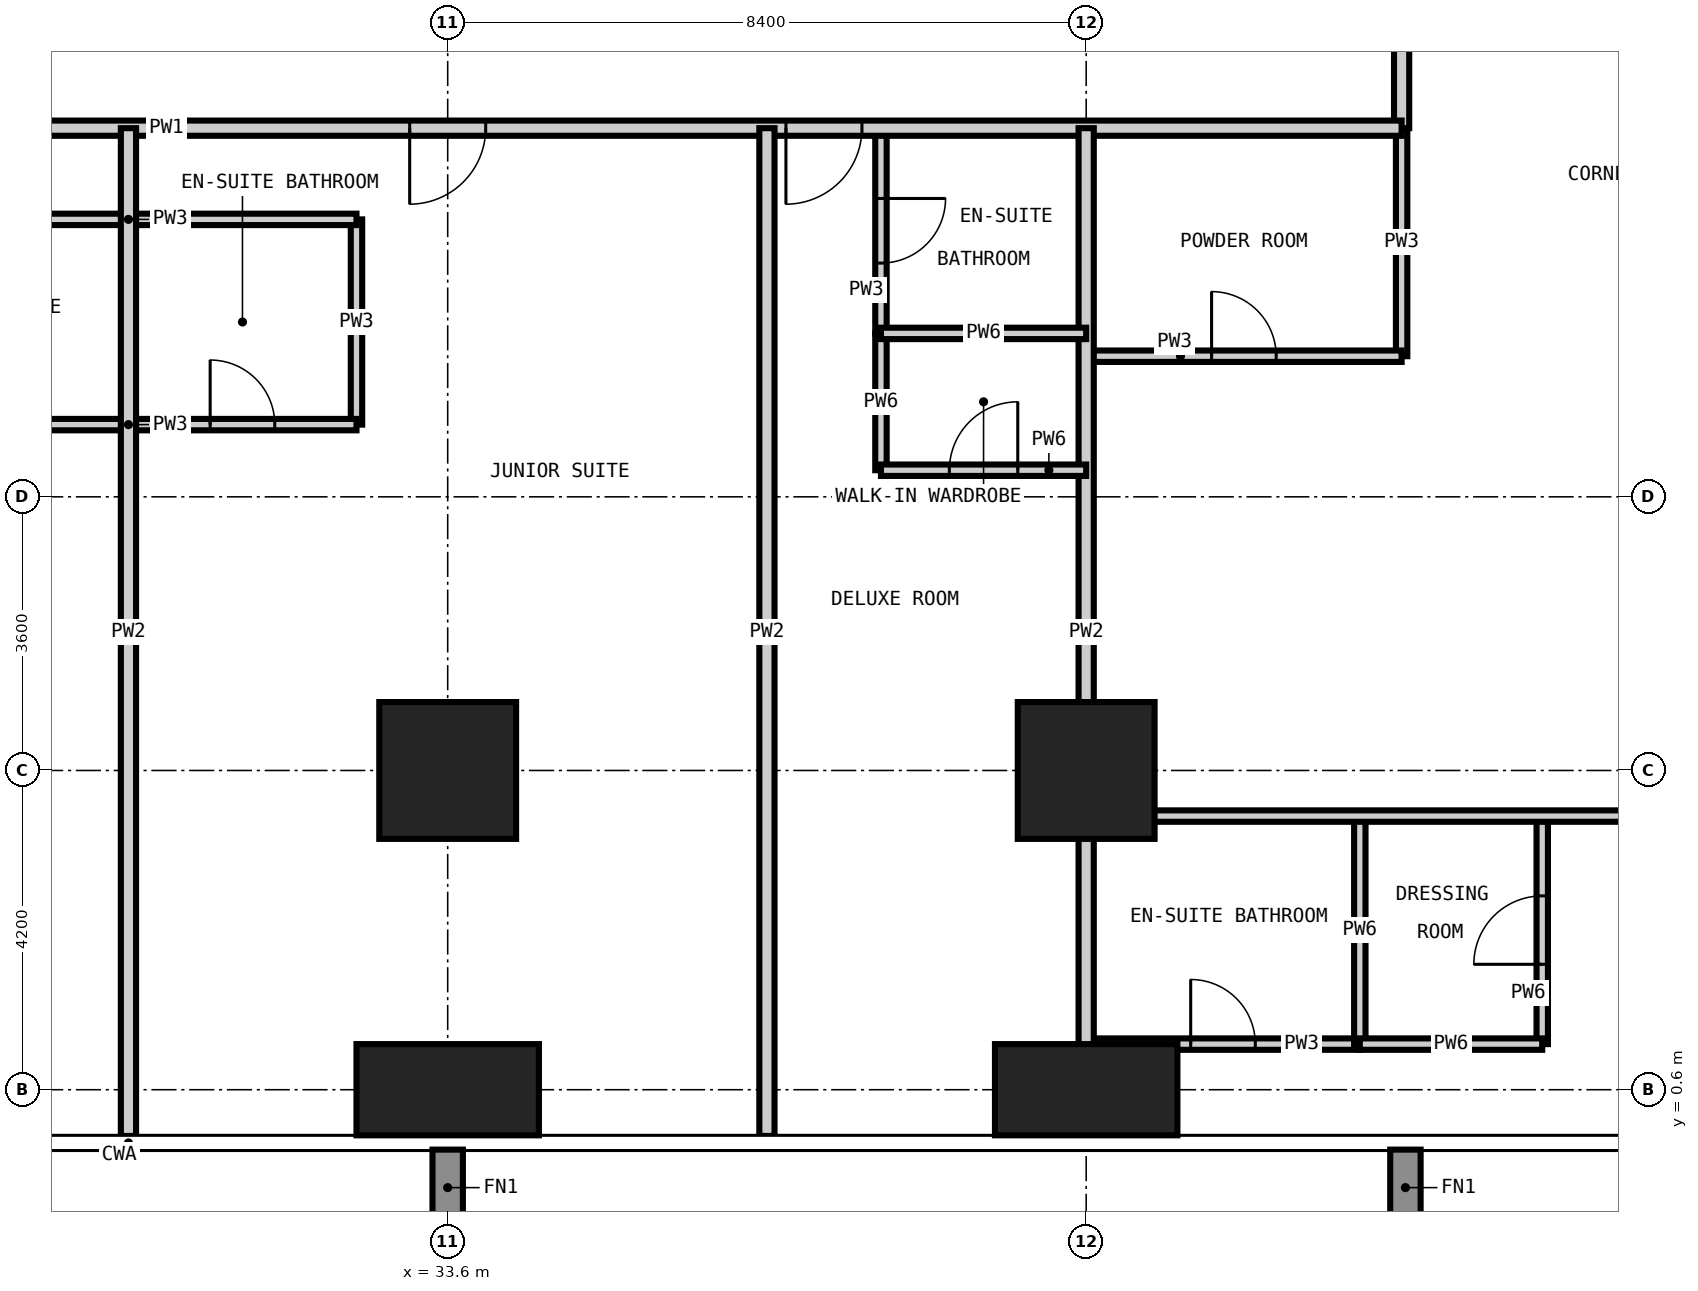
"""IFC4 building model, lengths in metres.
Left out: names, types, materials, properties, quantities, classifications, styles, units other than length and angle.
Written with IfcOpenShell. Run it as: python <this file> out.ifc"""

import sys

from ifc_helpers import new_model, si_unit, direction, frame, frame_2d, origin, origin_2d, place, context, subcontext, project, spatial, rectangle, extrude, element, fill, save


model = new_model("IFC4")
c1 = context("Model", 3, precision=1e-05, world=origin(), true_north=direction((0.0, 1.0)))
c2 = subcontext(c1, "Body", "Model", "MODEL_VIEW")
j1 = project(units=[si_unit("LENGTHUNIT", "METRE"), si_unit("PLANEANGLEUNIT", "RADIAN")], contexts=[c1])
p1 = place(None, origin())
s1 = spatial("IfcSite", under=j1, at=p1, CompositionType="ELEMENT")
p2 = place(p1, origin())
s2 = spatial("IfcBuilding", under=s1, at=p2, CompositionType="ELEMENT")
p3 = place(p2, frame((0.0, 0.0, 63.0)))
s3 = spatial("IfcBuildingStorey", under=s2, at=p3, CompositionType="ELEMENT", Elevation=63.0)
p4 = place(p3, frame((33.6, 0.6, -0.35), z_axis=(0.0, 0.0, 1.0), x_axis=(1.0, 0.0, 0.0)))
e1 = element("IfcColumn", 1, at=p4, inside=s3, PredefinedType="COLUMN", context=c2, shape_type="SweptSolid", body=[
    extrude(rectangle(XDim=2.4, YDim=1.2, at=origin_2d()), origin(), (0.0, 0.0, 1.0), 3.6),
])
p5 = place(p3, frame((33.6, 4.8, -0.35), z_axis=(0.0, 0.0, 1.0), x_axis=(1.0, 0.0, 0.0)))
e2 = element("IfcColumn", 2, at=p5, inside=s3, PredefinedType="COLUMN", context=c2, shape_type="SweptSolid", body=[
    extrude(rectangle(XDim=1.8, YDim=1.8, at=origin_2d()), origin(), (0.0, 0.0, 1.0), 3.6),
])
p6 = place(p3, frame((42.0, 0.6, -0.35), z_axis=(0.0, 0.0, 1.0), x_axis=(1.0, 0.0, 0.0)))
e3 = element("IfcColumn", 3, at=p6, inside=s3, PredefinedType="COLUMN", context=c2, shape_type="SweptSolid", body=[
    extrude(rectangle(XDim=2.4, YDim=1.2, at=origin_2d()), origin(), (0.0, 0.0, 1.0), 3.6),
])
p7 = place(p3, frame((42.0, 4.8, -0.35), z_axis=(0.0, 0.0, 1.0), x_axis=(1.0, 0.0, 0.0)))
e4 = element("IfcColumn", 4, at=p7, inside=s3, PredefinedType="COLUMN", context=c2, shape_type="SweptSolid", body=[
    extrude(rectangle(XDim=1.8, YDim=1.8, at=origin_2d()), origin(), (0.0, 0.0, 1.0), 3.6),
])
p8 = place(p3, frame((32.4, 9.35, 0.0), z_axis=(0.0, 0.0, 1.0), x_axis=(0.0, 1.0, 0.0)))
e5 = element("IfcWall", 5, at=p8, inside=s3, PredefinedType="PARTITIONING", context=c2, shape_type="SweptSolid", body=[
    extrude(rectangle(XDim=2.7, YDim=0.15, at=frame_2d((1.35, 0.0))), origin(), (0.0, 0.0, 1.0), 3.25),
])
p9 = place(p3, frame((39.3, 10.55, 0.0), z_axis=(0.0, 0.0, 1.0), x_axis=(0.0, 1.0, 0.0)))
e6 = element("IfcWall", 6, at=p9, inside=s3, PredefinedType="PARTITIONING", context=c2, shape_type="SweptSolid", body=[
    extrude(rectangle(XDim=2.7, YDim=0.15, at=frame_2d((1.35, 0.0))), origin(), (0.0, 0.0, 1.0), 3.25),
])
p10 = place(p9, frame((0.925, 0.0, 0.0)))
e7 = element("IfcOpeningElement", 7, at=p10, cuts=e6, PredefinedType="OPENING", context=c2, shape_type="SweptSolid", body=[
    extrude(rectangle(XDim=0.85, YDim=2.1, at=frame_2d((0.425, 1.05))), frame((0.0, 0.085, 0.0), z_axis=(0.0, -1.0, 0.0), x_axis=(1.0, 0.0, 0.0)), (0.0, 0.0, 1.0), 0.17),
])
p11 = place(p3, frame((46.15, 10.25, 0.0), z_axis=(0.0, 0.0, 1.0), x_axis=(0.0, 1.0, 0.0)))
e8 = element("IfcWall", 8, at=p11, inside=s3, PredefinedType="PARTITIONING", context=c2, shape_type="SweptSolid", body=[
    extrude(rectangle(XDim=3.0, YDim=0.15, at=frame_2d((1.5, 0.0))), origin(), (0.0, 0.0, 1.0), 3.25),
])
p12 = place(p3, frame((42.0, 1.2, 0.0), z_axis=(0.0, 0.0, 1.0), x_axis=(1.0, 0.0, 0.0)))
e9 = element("IfcWall", 9, at=p12, inside=s3, PredefinedType="PARTITIONING", context=c2, shape_type="SweptSolid", body=[
    extrude(rectangle(XDim=3.6, YDim=0.15, at=frame_2d((1.8, 0.0))), origin(), (0.0, 0.0, 1.0), 3.25),
])
p13 = place(p12, frame((1.375, 0.0, 0.0)))
e10 = element("IfcOpeningElement", 10, at=p13, cuts=e9, PredefinedType="OPENING", context=c2, shape_type="SweptSolid", body=[
    extrude(rectangle(XDim=0.85, YDim=2.1, at=frame_2d((0.425, 1.05))), frame((0.0, 0.085, 0.0), z_axis=(0.0, -1.0, 0.0), x_axis=(1.0, 0.0, 0.0)), (0.0, 0.0, 1.0), 0.17),
])
p14 = place(p3, frame((26.4, 9.35, 0.0), z_axis=(0.0, 0.0, 1.0), x_axis=(1.0, 0.0, 0.0)))
e11 = element("IfcWall", 11, at=p14, inside=s3, PredefinedType="PARTITIONING", context=c2, shape_type="SweptSolid", body=[
    extrude(rectangle(XDim=6.0, YDim=0.15, at=frame_2d((3.0, 0.0))), origin(), (0.0, 0.0, 1.0), 3.25),
])
p15 = place(p14, frame((4.075, 0.0, 0.0)))
e12 = element("IfcOpeningElement", 12, at=p15, cuts=e11, PredefinedType="OPENING", context=c2, shape_type="SweptSolid", body=[
    extrude(rectangle(XDim=0.85, YDim=2.1, at=frame_2d((0.425, 1.05))), frame((0.0, 0.085, 0.0), z_axis=(0.0, -1.0, 0.0), x_axis=(1.0, 0.0, 0.0)), (0.0, 0.0, 1.0), 0.17),
])
p16 = place(p3, frame((42.0, 10.25, 0.0), z_axis=(0.0, 0.0, 1.0), x_axis=(1.0, 0.0, 0.0)))
e13 = element("IfcWall", 13, at=p16, inside=s3, PredefinedType="PARTITIONING", context=c2, shape_type="SweptSolid", body=[
    extrude(rectangle(XDim=4.15, YDim=0.15, at=frame_2d((2.075, 0.0))), origin(), (0.0, 0.0, 1.0), 3.25),
])
p17 = place(p16, frame((1.65, 0.0, 0.0)))
e14 = element("IfcOpeningElement", 14, at=p17, cuts=e13, PredefinedType="OPENING", context=c2, shape_type="SweptSolid", body=[
    extrude(rectangle(XDim=0.85, YDim=2.1, at=frame_2d((0.425, 1.05))), frame((0.0, 0.085, 0.0), z_axis=(0.0, -1.0, 0.0), x_axis=(1.0, 0.0, 0.0)), (0.0, 0.0, 1.0), 0.17),
])
p18 = place(p3, frame((26.4, 12.05, 0.0), z_axis=(0.0, 0.0, 1.0), x_axis=(1.0, 0.0, 0.0)))
e15 = element("IfcWall", 15, at=p18, inside=s3, PredefinedType="PARTITIONING", context=c2, shape_type="SweptSolid", body=[
    extrude(rectangle(XDim=6.0, YDim=0.15, at=frame_2d((3.0, 0.0))), origin(), (0.0, 0.0, 1.0), 3.25),
])
p19 = place(p18, frame((1.075, 0.0, 0.0)))
e16 = element("IfcOpeningElement", 16, at=p19, cuts=e15, PredefinedType="OPENING", context=c2, shape_type="SweptSolid", body=[
    extrude(rectangle(XDim=0.85, YDim=2.1, at=frame_2d((0.425, 1.05))), frame((0.0, 0.085, 0.0), z_axis=(0.0, -1.0, 0.0), x_axis=(1.0, 0.0, 0.0)), (0.0, 0.0, 1.0), 0.17),
])
p20 = place(p3, frame((46.15, 44.95, 0.0), z_axis=(0.0, 0.0, 1.0), x_axis=(0.0, -1.0, 0.0)))
e17 = element("IfcWall", 17, at=p20, inside=s3, PredefinedType="PARTITIONING", context=c2, shape_type="SweptSolid", body=[
    extrude(rectangle(XDim=31.7, YDim=0.2, at=frame_2d((15.85, 0.0))), origin(), (0.0, 0.0, 1.0), 3.25),
])
p21 = place(p20, frame((24.65, 0.0, 0.0)))
e18 = element("IfcOpeningElement", 18, at=p21, cuts=e17, PredefinedType="OPENING", context=c2, shape_type="SweptSolid", body=[
    extrude(rectangle(XDim=1.0, YDim=2.2, at=frame_2d((0.5, 1.1))), frame((0.0, 0.11, 0.0), z_axis=(0.0, -1.0, 0.0), x_axis=(1.0, 0.0, 0.0)), (0.0, 0.0, 1.0), 0.22),
])
p22 = place(p20, frame((13.85, 0.0, 0.0)))
e19 = element("IfcOpeningElement", 19, at=p22, cuts=e17, PredefinedType="OPENING", context=c2, shape_type="SweptSolid", body=[
    extrude(rectangle(XDim=1.0, YDim=2.2, at=frame_2d((0.5, 1.1))), frame((0.0, 0.11, 0.0), z_axis=(0.0, -1.0, 0.0), x_axis=(1.0, 0.0, 0.0)), (0.0, 0.0, 1.0), 0.22),
])
p23 = place(p20, frame((7.85, 0.0, 0.0)))
e20 = element("IfcOpeningElement", 20, at=p23, cuts=e17, PredefinedType="OPENING", context=c2, shape_type="SweptSolid", body=[
    extrude(rectangle(XDim=1.0, YDim=2.2, at=frame_2d((0.5, 1.1))), frame((0.0, 0.11, 0.0), z_axis=(0.0, -1.0, 0.0), x_axis=(1.0, 0.0, 0.0)), (0.0, 0.0, 1.0), 0.22),
])
p24 = place(p20, frame((29.425, 0.0, 0.0)))
e21 = element("IfcOpeningElement", 21, at=p24, cuts=e17, PredefinedType="OPENING", context=c2, shape_type="SweptSolid", body=[
    extrude(rectangle(XDim=1.0, YDim=2.2, at=frame_2d((0.5, 1.1))), frame((0.0, 0.11, 0.0), z_axis=(0.0, -1.0, 0.0), x_axis=(1.0, 0.0, 0.0)), (0.0, 0.0, 1.0), 0.22),
])
p25 = place(p20, frame((0.975, 0.0, 0.0)))
e22 = element("IfcOpeningElement", 22, at=p25, cuts=e17, PredefinedType="OPENING", context=c2, shape_type="SweptSolid", body=[
    extrude(rectangle(XDim=1.0, YDim=2.2, at=frame_2d((0.5, 1.1))), frame((0.0, 0.11, 0.0), z_axis=(0.0, -1.0, 0.0), x_axis=(1.0, 0.0, 0.0)), (0.0, 0.0, 1.0), 0.22),
])
p26 = place(p3, frame((46.15, 13.25, 0.0), z_axis=(0.0, 0.0, 1.0), x_axis=(-1.0, 0.0, 0.0)))
e23 = element("IfcWall", 23, at=p26, inside=s3, PredefinedType="PARTITIONING", context=c2, shape_type="SweptSolid", body=[
    extrude(rectangle(XDim=32.9, YDim=0.2, at=frame_2d((16.45, 0.0))), origin(), (0.0, 0.0, 1.0), 3.25),
])
p27 = place(p26, frame((25.4, 0.0, 0.0)))
e24 = element("IfcOpeningElement", 24, at=p27, cuts=e23, PredefinedType="OPENING", context=c2, shape_type="SweptSolid", body=[
    extrude(rectangle(XDim=1.0, YDim=2.2, at=frame_2d((0.5, 1.1))), frame((0.0, 0.11, 0.0), z_axis=(0.0, -1.0, 0.0), x_axis=(1.0, 0.0, 0.0)), (0.0, 0.0, 1.0), 0.22),
])
p28 = place(p26, frame((20.45, 0.0, 0.0)))
e25 = element("IfcOpeningElement", 25, at=p28, cuts=e23, PredefinedType="OPENING", context=c2, shape_type="SweptSolid", body=[
    extrude(rectangle(XDim=1.0, YDim=2.2, at=frame_2d((0.5, 1.1))), frame((0.0, 0.11, 0.0), z_axis=(0.0, -1.0, 0.0), x_axis=(1.0, 0.0, 0.0)), (0.0, 0.0, 1.0), 0.22),
])
p29 = place(p26, frame((12.05, 0.0, 0.0)))
e26 = element("IfcOpeningElement", 26, at=p29, cuts=e23, PredefinedType="OPENING", context=c2, shape_type="SweptSolid", body=[
    extrude(rectangle(XDim=1.0, YDim=2.2, at=frame_2d((0.5, 1.1))), frame((0.0, 0.11, 0.0), z_axis=(0.0, -1.0, 0.0), x_axis=(1.0, 0.0, 0.0)), (0.0, 0.0, 1.0), 0.22),
])
p30 = place(p26, frame((7.1, 0.0, 0.0)))
e27 = element("IfcOpeningElement", 27, at=p30, cuts=e23, PredefinedType="OPENING", context=c2, shape_type="SweptSolid", body=[
    extrude(rectangle(XDim=1.0, YDim=2.2, at=frame_2d((0.5, 1.1))), frame((0.0, 0.11, 0.0), z_axis=(0.0, -1.0, 0.0), x_axis=(1.0, 0.0, 0.0)), (0.0, 0.0, 1.0), 0.22),
])
for number, where, z_axis, x_axis in (
    (28, (29.4, -0.008, 0.0), (0.0, 0.0, 1.0), (0.0, 1.0, 0.0)),
    (29, (37.8, -0.008, 0.0), (0.0, 0.0, 1.0), (0.0, 1.0, 0.0)),
    (30, (42.0, -0.008, 0.0), (0.0, 0.0, 1.0), (0.0, 1.0, 0.0)),
):
    element("IfcWall", number, at=place(p3, frame(where, z_axis=z_axis, x_axis=x_axis)), inside=s3, PredefinedType="PARTITIONING", context=c2, shape_type="SweptSolid", body=[
        extrude(rectangle(XDim=13.258, YDim=0.2, at=frame_2d((6.629, 0.0))), origin(), (0.0, 0.0, 1.0), 3.25),
    ])
p31 = place(p3, frame((39.3, 8.75, 0.0), z_axis=(0.0, 0.0, 1.0), x_axis=(0.0, 1.0, 0.0)))
e31 = element("IfcWall", 31, at=p31, inside=s3, PredefinedType="PARTITIONING", context=c2, shape_type="SweptSolid", body=[
    extrude(rectangle(XDim=1.8, YDim=0.15, at=frame_2d((0.9, 0.0))), origin(), (0.0, 0.0, 1.0), 3.25),
])
p32 = place(p3, frame((45.6, 1.2, 0.0), z_axis=(0.0, 0.0, 1.0), x_axis=(0.0, 1.0, 0.0)))
e32 = element("IfcWall", 32, at=p32, inside=s3, PredefinedType="PARTITIONING", context=c2, shape_type="SweptSolid", body=[
    extrude(rectangle(XDim=3.0, YDim=0.15, at=frame_2d((1.5, 0.0))), origin(), (0.0, 0.0, 1.0), 3.25),
])
p33 = place(p3, frame((48.0, 1.2, 0.0), z_axis=(0.0, 0.0, 1.0), x_axis=(0.0, 1.0, 0.0)))
e33 = element("IfcWall", 33, at=p33, inside=s3, PredefinedType="PARTITIONING", context=c2, shape_type="SweptSolid", body=[
    extrude(rectangle(XDim=3.0, YDim=0.15, at=frame_2d((1.5, 0.0))), origin(), (0.0, 0.0, 1.0), 3.25),
])
p34 = place(p33, frame((1.05, 0.0, 0.0)))
e34 = element("IfcOpeningElement", 34, at=p34, cuts=e33, PredefinedType="OPENING", context=c2, shape_type="SweptSolid", body=[
    extrude(rectangle(XDim=0.9, YDim=2.1, at=frame_2d((0.45, 1.05))), frame((0.0, 0.085, 0.0), z_axis=(0.0, -1.0, 0.0), x_axis=(1.0, 0.0, 0.0)), (0.0, 0.0, 1.0), 0.17),
])
p35 = place(p3, frame((45.6, 1.2, 0.0), z_axis=(0.0, 0.0, 1.0), x_axis=(1.0, 0.0, 0.0)))
e35 = element("IfcWall", 35, at=p35, inside=s3, PredefinedType="PARTITIONING", context=c2, shape_type="SweptSolid", body=[
    extrude(rectangle(XDim=2.4, YDim=0.15, at=frame_2d((1.2, 0.0))), origin(), (0.0, 0.0, 1.0), 3.25),
])
p36 = place(p3, frame((42.0, 4.2, 0.0), z_axis=(0.0, 0.0, 1.0), x_axis=(1.0, 0.0, 0.0)))
e36 = element("IfcWall", 36, at=p36, inside=s3, PredefinedType="PARTITIONING", context=c2, shape_type="SweptSolid", body=[
    extrude(rectangle(XDim=16.808, YDim=0.15, at=frame_2d((8.404, 0.0))), origin(), (0.0, 0.0, 1.0), 3.25),
])
p37 = place(p36, frame((10.95, 0.0, 0.0)))
e37 = element("IfcOpeningElement", 37, at=p37, cuts=e36, PredefinedType="OPENING", context=c2, shape_type="SweptSolid", body=[
    extrude(rectangle(XDim=0.9, YDim=2.1, at=frame_2d((0.45, 1.05))), frame((0.0, 0.085, 0.0), z_axis=(0.0, -1.0, 0.0), x_axis=(1.0, 0.0, 0.0)), (0.0, 0.0, 1.0), 0.17),
])
p38 = place(p3, frame((39.3, 8.75, 0.0), z_axis=(0.0, 0.0, 1.0), x_axis=(1.0, 0.0, 0.0)))
e38 = element("IfcWall", 38, at=p38, inside=s3, PredefinedType="PARTITIONING", context=c2, shape_type="SweptSolid", body=[
    extrude(rectangle(XDim=2.7, YDim=0.15, at=frame_2d((1.35, 0.0))), origin(), (0.0, 0.0, 1.0), 3.25),
])
p39 = place(p38, frame((0.9, 0.0, 0.0)))
e39 = element("IfcOpeningElement", 39, at=p39, cuts=e38, PredefinedType="OPENING", context=c2, shape_type="SweptSolid", body=[
    extrude(rectangle(XDim=0.9, YDim=2.1, at=frame_2d((0.45, 1.05))), frame((0.0, 0.085, 0.0), z_axis=(0.0, -1.0, 0.0), x_axis=(1.0, 0.0, 0.0)), (0.0, 0.0, 1.0), 0.17),
])
p40 = place(p3, frame((39.3, 10.55, 0.0), z_axis=(0.0, 0.0, 1.0), x_axis=(1.0, 0.0, 0.0)))
e40 = element("IfcWall", 40, at=p40, inside=s3, PredefinedType="PARTITIONING", context=c2, shape_type="SweptSolid", body=[
    extrude(rectangle(XDim=2.7, YDim=0.15, at=frame_2d((1.35, 0.0))), origin(), (0.0, 0.0, 1.0), 3.25),
])
p41 = place(p29, origin())
e41 = element("IfcDoor", 41, at=p41, inside=s3, OperationType="SINGLE_SWING_RIGHT", PredefinedType="DOOR", context=c2, shape_type="SweptSolid", body=[
    extrude(rectangle(XDim=1.0, YDim=2.2, at=frame_2d((0.5, 1.1))), frame((0.0, 0.025, 0.0), z_axis=(0.0, -1.0, 0.0), x_axis=(1.0, 0.0, 0.0)), (0.0, 0.0, 1.0), 0.05),
])
fill(e26, e41)
p42 = place(p15, origin())
e42 = element("IfcDoor", 42, at=p42, inside=s3, OperationType="SINGLE_SWING_LEFT", PredefinedType="DOOR", context=c2, shape_type="SweptSolid", body=[
    extrude(rectangle(XDim=0.85, YDim=2.1, at=frame_2d((0.425, 1.05))), frame((0.0, 0.025, 0.0), z_axis=(0.0, -1.0, 0.0), x_axis=(1.0, 0.0, 0.0)), (0.0, 0.0, 1.0), 0.05),
])
fill(e12, e42)
p43 = place(p30, origin())
e43 = element("IfcDoor", 43, at=p43, inside=s3, OperationType="SINGLE_SWING_RIGHT", PredefinedType="DOOR", context=c2, shape_type="SweptSolid", body=[
    extrude(rectangle(XDim=1.0, YDim=2.2, at=frame_2d((0.5, 1.1))), frame((0.0, 0.025, 0.0), z_axis=(0.0, -1.0, 0.0), x_axis=(1.0, 0.0, 0.0)), (0.0, 0.0, 1.0), 0.05),
])
fill(e27, e43)
p44 = place(p10, frame((0.85, 0.0, 0.0), z_axis=(0.0, 0.0, 1.0), x_axis=(-1.0, 0.0, 0.0)))
e44 = element("IfcDoor", 44, at=p44, inside=s3, OperationType="SINGLE_SWING_LEFT", PredefinedType="DOOR", context=c2, shape_type="SweptSolid", body=[
    extrude(rectangle(XDim=0.85, YDim=2.1, at=frame_2d((0.425, 1.05))), frame((0.0, 0.025, 0.0), z_axis=(0.0, -1.0, 0.0), x_axis=(1.0, 0.0, 0.0)), (0.0, 0.0, 1.0), 0.05),
])
fill(e7, e44)
p45 = place(p39, origin())
e45 = element("IfcDoor", 45, at=p45, inside=s3, OperationType="SINGLE_SWING_RIGHT", PredefinedType="DOOR", context=c2, shape_type="SweptSolid", body=[
    extrude(rectangle(XDim=0.9, YDim=2.1, at=frame_2d((0.45, 1.05))), frame((0.0, 0.025, 0.0), z_axis=(0.0, -1.0, 0.0), x_axis=(1.0, 0.0, 0.0)), (0.0, 0.0, 1.0), 0.05),
])
fill(e39, e45)
p46 = place(p17, origin())
e46 = element("IfcDoor", 46, at=p46, inside=s3, OperationType="SINGLE_SWING_LEFT", PredefinedType="DOOR", context=c2, shape_type="SweptSolid", body=[
    extrude(rectangle(XDim=0.85, YDim=2.1, at=frame_2d((0.425, 1.05))), frame((0.0, 0.025, 0.0), z_axis=(0.0, -1.0, 0.0), x_axis=(1.0, 0.0, 0.0)), (0.0, 0.0, 1.0), 0.05),
])
fill(e14, e46)
p47 = place(p13, origin())
e47 = element("IfcDoor", 47, at=p47, inside=s3, OperationType="SINGLE_SWING_LEFT", PredefinedType="DOOR", context=c2, shape_type="SweptSolid", body=[
    extrude(rectangle(XDim=0.85, YDim=2.1, at=frame_2d((0.425, 1.05))), frame((0.0, 0.025, 0.0), z_axis=(0.0, -1.0, 0.0), x_axis=(1.0, 0.0, 0.0)), (0.0, 0.0, 1.0), 0.05),
])
fill(e10, e47)
p48 = place(p34, origin())
e48 = element("IfcDoor", 48, at=p48, inside=s3, OperationType="SINGLE_SWING_LEFT", PredefinedType="DOOR", context=c2, shape_type="SweptSolid", body=[
    extrude(rectangle(XDim=0.9, YDim=2.1, at=frame_2d((0.45, 1.05))), frame((0.0, 0.025, 0.0), z_axis=(0.0, -1.0, 0.0), x_axis=(1.0, 0.0, 0.0)), (0.0, 0.0, 1.0), 0.05),
])
fill(e34, e48)
save(model, sys.argv[1])
